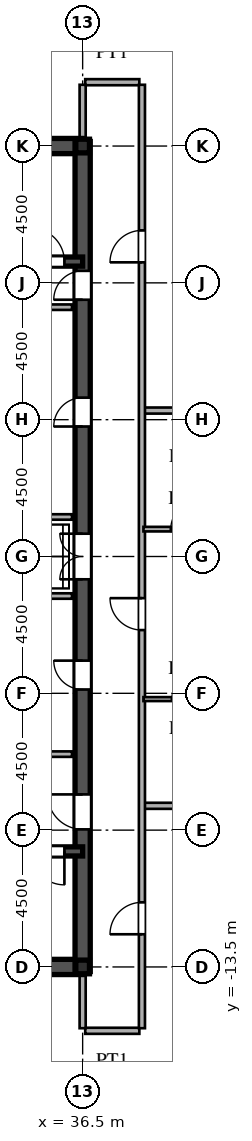
"""IFC4 building model, lengths in metres.
Left out: names, types, materials, properties, quantities, classifications, styles, units other than length and angle.
Written with IfcOpenShell. Run it as: python <this file> out.ifc"""

import sys

from ifc_helpers import new_model, si_unit, direction, frame, frame_2d, origin, origin_2d, place, context, subcontext, project, spatial, rectangle, i_section, extrude, source, transform, mapped, element, fill, save


model = new_model("IFC4")
c1 = context("Model", 3, precision=1e-05, world=origin(), true_north=direction((0.0, 1.0)))
c2 = subcontext(c1, "Body", "Model", "MODEL_VIEW")
j1 = project(units=[si_unit("LENGTHUNIT", "METRE"), si_unit("PLANEANGLEUNIT", "RADIAN")], contexts=[c1])
p1 = place(None, origin())
s1 = spatial("IfcSite", under=j1, at=p1, CompositionType="ELEMENT")
p2 = place(p1, origin())
s2 = spatial("IfcBuilding", under=s1, at=p2, CompositionType="ELEMENT")
p3 = place(p2, frame((0.0, 0.0, 250.65)))
s3 = spatial("IfcBuildingStorey", under=s2, at=p3, CompositionType="ELEMENT", Elevation=250.65)
m1 = source(origin(), c2, "Body", "SweptSolid", [
    extrude(i_section(OverallWidth=0.45, OverallDepth=0.45, WebThickness=0.016, FlangeThickness=0.025, at=origin_2d()), origin(), (0.0, 0.0, 1.0), 3.75),
])
for number, where, z_axis, x_axis in (
    (1, (36.5, -13.5, 0.0), (0.0, 0.0, 1.0), (1.0, 0.0, 0.0)),
    (2, (36.5, 13.5, 0.0), (0.0, 0.0, 1.0), (1.0, 0.0, 0.0)),
):
    element("IfcColumn", number, at=place(p3, frame(where, z_axis=z_axis, x_axis=x_axis)), inside=s3, PredefinedType="COLUMN", context=c2, shape_type="MappedRepresentation", body=[
        mapped(m1, transform((0.0, 0.0, 0.0), scale=1.0)),
    ])
for number, where, z_axis, x_axis in (
    (3, (27.5, -13.5, 0.0), (0.0, 0.0, 1.0), (1.0, 0.0, 0.0)),
    (4, (27.5, 13.5, 0.0), (0.0, 0.0, 1.0), (1.0, 0.0, 0.0)),
):
    element("IfcWall", number, at=place(p3, frame(where, z_axis=z_axis, x_axis=x_axis)), inside=s3, PredefinedType="SHEAR", context=c2, shape_type="SweptSolid", body=[
        extrude(rectangle(XDim=9.0, YDim=0.5, at=frame_2d((4.5, 0.0))), origin(), (0.0, 0.0, 1.0), 3.53),
    ])
p4 = place(p3, frame((36.5, -13.65, 0.0), z_axis=(0.0, 0.0, 1.0), x_axis=(0.0, 1.0, 0.0)))
e5 = element("IfcWall", 5, at=p4, inside=s3, PredefinedType="SHEAR", context=c2, shape_type="SweptSolid", body=[
    extrude(rectangle(XDim=7.15, YDim=0.5, at=frame_2d((3.575, 0.0))), origin(), (0.0, 0.0, 1.0), 3.53),
])
p5 = place(p4, frame((4.675, 0.0, 0.0)))
e6 = element("IfcOpeningElement", 6, at=p5, cuts=e5, PredefinedType="OPENING", context=c2, shape_type="SweptSolid", body=[
    extrude(rectangle(XDim=1.15, YDim=2.2, at=frame_2d((0.575, 1.1))), frame((0.0, 0.26, 0.0), z_axis=(0.0, -1.0, 0.0), x_axis=(1.0, 0.0, 0.0)), (0.0, 0.0, 1.0), 0.52),
])
p6 = place(p3, frame((36.5, -1.3, 0.0), z_axis=(0.0, 0.0, 1.0), x_axis=(0.0, 1.0, 0.0)))
e7 = element("IfcWall", 7, at=p6, inside=s3, PredefinedType="SHEAR", context=c2, shape_type="SweptSolid", body=[
    extrude(rectangle(XDim=2.6, YDim=0.5, at=frame_2d((1.3, 0.0))), origin(), (0.0, 0.0, 1.0), 3.53),
])
p7 = place(p6, frame((0.55, 0.0, 0.0)))
e8 = element("IfcOpeningElement", 8, at=p7, cuts=e7, PredefinedType="OPENING", context=c2, shape_type="SweptSolid", body=[
    extrude(rectangle(XDim=1.5, YDim=2.3, at=frame_2d((0.75, 1.15))), frame((0.0, 0.26, 0.0), z_axis=(0.0, -1.0, 0.0), x_axis=(1.0, 0.0, 0.0)), (0.0, 0.0, 1.0), 0.52),
])
p8 = place(p3, frame((36.5, 8.2, 0.0), z_axis=(0.0, 0.0, 1.0), x_axis=(0.0, 1.0, 0.0)))
e9 = element("IfcWall", 9, at=p8, inside=s3, PredefinedType="SHEAR", context=c2, shape_type="SweptSolid", body=[
    extrude(rectangle(XDim=5.45, YDim=0.5, at=frame_2d((2.725, 0.0))), origin(), (0.0, 0.0, 1.0), 3.53),
])
p9 = place(p8, frame((0.245, 0.0, 0.0)))
e10 = element("IfcOpeningElement", 10, at=p9, cuts=e9, PredefinedType="OPENING", context=c2, shape_type="SweptSolid", body=[
    extrude(rectangle(XDim=0.95, YDim=2.15, at=frame_2d((0.475, 1.075))), frame((0.0, 0.26, 0.0), z_axis=(0.0, -1.0, 0.0), x_axis=(1.0, 0.0, 0.0)), (0.0, 0.0, 1.0), 0.52),
])
p10 = place(p3, frame((36.5, -6.5, 0.0), z_axis=(0.0, 0.0, 1.0), x_axis=(0.0, 1.0, 0.0)))
e11 = element("IfcWall", 11, at=p10, inside=s3, PredefinedType="SHEAR", context=c2, shape_type="SweptSolid", body=[
    extrude(rectangle(XDim=5.2, YDim=0.5, at=frame_2d((2.6, 0.0))), origin(), (0.0, 0.0, 1.0), 3.53),
])
p11 = place(p10, frame((2.125, 0.0, 0.0)))
e12 = element("IfcOpeningElement", 12, at=p11, cuts=e11, PredefinedType="OPENING", context=c2, shape_type="SweptSolid", body=[
    extrude(rectangle(XDim=0.95, YDim=2.15, at=frame_2d((0.475, 1.075))), frame((0.0, 0.26, 0.0), z_axis=(0.0, -1.0, 0.0), x_axis=(1.0, 0.0, 0.0)), (0.0, 0.0, 1.0), 0.52),
])
p12 = place(p3, frame((36.5, 1.3, 0.0), z_axis=(0.0, 0.0, 1.0), x_axis=(0.0, 1.0, 0.0)))
e13 = element("IfcWall", 13, at=p12, inside=s3, PredefinedType="SHEAR", context=c2, shape_type="SweptSolid", body=[
    extrude(rectangle(XDim=6.9, YDim=0.5, at=frame_2d((3.45, 0.0))), origin(), (0.0, 0.0, 1.0), 3.53),
])
p13 = place(p12, frame((2.975, 0.0, 0.0)))
e14 = element("IfcOpeningElement", 14, at=p13, cuts=e13, PredefinedType="OPENING", context=c2, shape_type="SweptSolid", body=[
    extrude(rectangle(XDim=0.95, YDim=2.15, at=frame_2d((0.475, 1.075))), frame((0.0, 0.26, 0.0), z_axis=(0.0, -1.0, 0.0), x_axis=(1.0, 0.0, 0.0)), (0.0, 0.0, 1.0), 0.52),
])
p14 = place(p3, frame((27.5, -9.7, 0.0), z_axis=(0.0, 0.0, 1.0), x_axis=(1.0, 0.0, 0.0)))
e15 = element("IfcWall", 15, at=p14, inside=s3, PredefinedType="SHEAR", context=c2, shape_type="SweptSolid", body=[
    extrude(rectangle(XDim=9.0, YDim=0.3, at=frame_2d((4.5, 0.0))), origin(), (0.0, 0.0, 1.0), 3.53),
])
p15 = place(p14, frame((7.3, 0.0, 0.0)))
e16 = element("IfcOpeningElement", 16, at=p15, cuts=e15, PredefinedType="OPENING", context=c2, shape_type="SweptSolid", body=[
    extrude(rectangle(XDim=1.1, YDim=2.2, at=frame_2d((0.55, 1.1))), frame((0.0, 0.16, 0.0), z_axis=(0.0, -1.0, 0.0), x_axis=(1.0, 0.0, 0.0)), (0.0, 0.0, 1.0), 0.32),
])
p16 = place(p3, frame((27.5, 9.7, 0.0), z_axis=(0.0, 0.0, 1.0), x_axis=(1.0, 0.0, 0.0)))
e17 = element("IfcWall", 17, at=p16, inside=s3, PredefinedType="SHEAR", context=c2, shape_type="SweptSolid", body=[
    extrude(rectangle(XDim=9.0, YDim=0.3, at=frame_2d((4.5, 0.0))), origin(), (0.0, 0.0, 1.0), 3.53),
])
p17 = place(p16, frame((7.3, 0.0, 0.0)))
e18 = element("IfcOpeningElement", 18, at=p17, cuts=e17, PredefinedType="OPENING", context=c2, shape_type="SweptSolid", body=[
    extrude(rectangle(XDim=1.1, YDim=2.2, at=frame_2d((0.55, 1.1))), frame((0.0, 0.16, 0.0), z_axis=(0.0, -1.0, 0.0), x_axis=(1.0, 0.0, 0.0)), (0.0, 0.0, 1.0), 0.32),
])
for number, where, z_axis, x_axis in (
    (19, (30.45, -6.5, 0.0), (0.0, 0.0, 1.0), (1.0, 0.0, 0.0)),
    (20, (30.45, 8.2, 0.0), (0.0, 0.0, 1.0), (1.0, 0.0, 0.0)),
):
    element("IfcWall", number, at=place(p3, frame(where, z_axis=z_axis, x_axis=x_axis)), inside=s3, PredefinedType="PARTITIONING", context=c2, shape_type="SweptSolid", body=[
        extrude(rectangle(XDim=5.7, YDim=0.18, at=frame_2d((2.85, 0.0))), origin(), (0.0, 0.0, 1.0), 3.53),
    ])
for number, where, z_axis, x_axis in (
    (21, (33.2, -1.3, 0.0), (0.0, 0.0, 1.0), (1.0, 0.0, 0.0)),
    (22, (33.2, 1.3, 0.0), (0.0, 0.0, 1.0), (1.0, 0.0, 0.0)),
):
    element("IfcWall", number, at=place(p3, frame(where, z_axis=z_axis, x_axis=x_axis)), inside=s3, PredefinedType="PARTITIONING", context=c2, shape_type="SweptSolid", body=[
        extrude(rectangle(XDim=2.95, YDim=0.18, at=frame_2d((1.475, 0.0))), origin(), (0.0, 0.0, 1.0), 3.53),
    ])
p18 = place(p3, frame((36.585, -15.6, 0.0), z_axis=(0.0, 0.0, 1.0), x_axis=(1.0, 0.0, 0.0)))
e23 = element("IfcWall", 23, at=p18, inside=s3, PredefinedType="PARTITIONING", context=c2, shape_type="SweptSolid", body=[
    extrude(rectangle(XDim=1.78, YDim=0.2, at=frame_2d((0.89, 0.0))), origin(), (0.0, 0.0, 1.0), 3.53),
])
p19 = place(p3, frame((38.53, -8.2, 0.0), z_axis=(0.0, 0.0, 1.0), x_axis=(1.0, 0.0, 0.0)))
e24 = element("IfcWall", 24, at=p19, inside=s3, PredefinedType="PARTITIONING", context=c2, shape_type="SweptSolid", body=[
    extrude(rectangle(XDim=17.813, YDim=0.2, at=frame_2d((8.906, 0.0))), origin(), (0.0, 0.0, 1.0), 3.53),
])
p20 = place(p3, frame((38.5, -4.69, 0.0), z_axis=(0.0, 0.0, 1.0), x_axis=(1.0, 0.0, 0.0)))
e25 = element("IfcWall", 25, at=p20, inside=s3, PredefinedType="PARTITIONING", context=c2, shape_type="SweptSolid", body=[
    extrude(rectangle(XDim=2.75, YDim=0.13, at=frame_2d((1.375, 0.0))), origin(), (0.0, 0.0, 1.0), 3.53),
])
p21 = place(p20, frame((0.935, 0.0, 0.0)))
e26 = element("IfcOpeningElement", 26, at=p21, cuts=e25, PredefinedType="OPENING", context=c2, shape_type="SweptSolid", body=[
    extrude(rectangle(XDim=0.88, YDim=2.1, at=frame_2d((0.44, 1.05))), frame((0.0, 0.075, 0.0), z_axis=(0.0, -1.0, 0.0), x_axis=(1.0, 0.0, 0.0)), (0.0, 0.0, 1.0), 0.15),
])
p22 = place(p3, frame((38.5, 0.9, 0.0), z_axis=(0.0, 0.0, 1.0), x_axis=(1.0, 0.0, 0.0)))
e27 = element("IfcWall", 27, at=p22, inside=s3, PredefinedType="PARTITIONING", context=c2, shape_type="SweptSolid", body=[
    extrude(rectangle(XDim=2.75, YDim=0.15, at=frame_2d((1.375, 0.0))), origin(), (0.0, 0.0, 1.0), 3.53),
])
p23 = place(p22, frame((0.9, 0.0, 0.0)))
e28 = element("IfcOpeningElement", 28, at=p23, cuts=e27, PredefinedType="OPENING", context=c2, shape_type="SweptSolid", body=[
    extrude(rectangle(XDim=0.95, YDim=2.15, at=frame_2d((0.475, 1.075))), frame((0.0, 0.085, 0.0), z_axis=(0.0, -1.0, 0.0), x_axis=(1.0, 0.0, 0.0)), (0.0, 0.0, 1.0), 0.17),
])
p24 = place(p3, frame((38.53, 4.8, 0.0), z_axis=(0.0, 0.0, 1.0), x_axis=(1.0, 0.0, 0.0)))
e29 = element("IfcWall", 29, at=p24, inside=s3, PredefinedType="PARTITIONING", context=c2, shape_type="SweptSolid", body=[
    extrude(rectangle(XDim=23.48, YDim=0.2, at=frame_2d((11.74, 0.0))), origin(), (0.0, 0.0, 1.0), 3.53),
])
p25 = place(p3, frame((36.585, 15.6, 0.0), z_axis=(0.0, 0.0, 1.0), x_axis=(1.0, 0.0, 0.0)))
e30 = element("IfcWall", 30, at=p25, inside=s3, PredefinedType="PARTITIONING", context=c2, shape_type="SweptSolid", body=[
    extrude(rectangle(XDim=1.78, YDim=0.2, at=frame_2d((0.89, 0.0))), origin(), (0.0, 0.0, 1.0), 3.53),
])
for number, where, z_axis, x_axis in (
    (31, (36.5, -15.515, 0.0), (0.0, 0.0, 1.0), (0.0, 1.0, 0.0)),
    (32, (36.5, 13.755, 0.0), (0.0, 0.0, 1.0), (0.0, 1.0, 0.0)),
):
    element("IfcWall", number, at=place(p3, frame(where, z_axis=z_axis, x_axis=x_axis)), inside=s3, PredefinedType="PARTITIONING", context=c2, shape_type="SweptSolid", body=[
        extrude(rectangle(XDim=1.76, YDim=0.2, at=frame_2d((0.88, 0.0))), origin(), (0.0, 0.0, 1.0), 2.93),
    ])
p26 = place(p3, frame((38.45, -15.515, 0.0), z_axis=(0.0, 0.0, 1.0), x_axis=(0.0, 1.0, 0.0)))
e33 = element("IfcWall", 33, at=p26, inside=s3, PredefinedType="PARTITIONING", context=c2, shape_type="SweptSolid", body=[
    extrude(rectangle(XDim=31.03, YDim=0.2, at=frame_2d((15.515, 0.0))), origin(), (0.0, 0.0, 1.0), 3.53),
])
p27 = place(p26, frame((3.09, 0.0, 0.0)))
e34 = element("IfcOpeningElement", 34, at=p27, cuts=e33, PredefinedType="OPENING", context=c2, shape_type="SweptSolid", body=[
    extrude(rectangle(XDim=1.05, YDim=2.25, at=frame_2d((0.525, 1.125))), frame((0.0, 0.11, 0.0), z_axis=(0.0, -1.0, 0.0), x_axis=(1.0, 0.0, 0.0)), (0.0, 0.0, 1.0), 0.22),
])
p28 = place(p26, frame((13.095, 0.0, 0.0)))
e35 = element("IfcOpeningElement", 35, at=p28, cuts=e33, PredefinedType="OPENING", context=c2, shape_type="SweptSolid", body=[
    extrude(rectangle(XDim=1.05, YDim=2.25, at=frame_2d((0.525, 1.125))), frame((0.0, 0.11, 0.0), z_axis=(0.0, -1.0, 0.0), x_axis=(1.0, 0.0, 0.0)), (0.0, 0.0, 1.0), 0.22),
])
p29 = place(p26, frame((25.19, 0.0, 0.0)))
e36 = element("IfcOpeningElement", 36, at=p29, cuts=e33, PredefinedType="OPENING", context=c2, shape_type="SweptSolid", body=[
    extrude(rectangle(XDim=1.05, YDim=2.25, at=frame_2d((0.525, 1.125))), frame((0.0, 0.11, 0.0), z_axis=(0.0, -1.0, 0.0), x_axis=(1.0, 0.0, 0.0)), (0.0, 0.0, 1.0), 0.22),
])
m2 = source(origin(), c2, "Body", "SweptSolid", [
    extrude(rectangle(XDim=1.15, YDim=2.2, at=frame_2d((0.575, 1.1))), frame((0.0, 0.025, 0.0), z_axis=(0.0, -1.0, 0.0), x_axis=(1.0, 0.0, 0.0)), (0.0, 0.0, 1.0), 0.05),
])
p30 = place(p5, origin())
e37 = element("IfcDoor", 37, at=p30, inside=s3, OperationType="SINGLE_SWING_RIGHT", PredefinedType="DOOR", context=c2, shape_type="MappedRepresentation", body=[
    mapped(m2, transform((0.0, 0.0, 0.0), scale=1.0)),
])
fill(e6, e37)
m3 = source(origin(), c2, "Body", "SweptSolid", [
    extrude(rectangle(XDim=1.5, YDim=2.3, at=frame_2d((0.75, 1.15))), frame((0.0, 0.025, 0.0), z_axis=(0.0, -1.0, 0.0), x_axis=(1.0, 0.0, 0.0)), (0.0, 0.0, 1.0), 0.05),
])
p31 = place(p7, origin())
e38 = element("IfcDoor", 38, at=p31, inside=s3, OperationType="DOUBLE_SWING_LEFT", PredefinedType="DOOR", context=c2, shape_type="MappedRepresentation", body=[
    mapped(m3, transform((0.0, 0.0, 0.0), scale=1.0)),
])
fill(e8, e38)
m4 = source(origin(), c2, "Body", "SweptSolid", [
    extrude(rectangle(XDim=0.95, YDim=2.15, at=frame_2d((0.475, 1.075))), frame((0.0, 0.025, 0.0), z_axis=(0.0, -1.0, 0.0), x_axis=(1.0, 0.0, 0.0)), (0.0, 0.0, 1.0), 0.05),
])
p32 = place(p9, origin())
e39 = element("IfcDoor", 39, at=p32, inside=s3, OperationType="SINGLE_SWING_LEFT", PredefinedType="DOOR", context=c2, shape_type="MappedRepresentation", body=[
    mapped(m4, transform((0.0, 0.0, 0.0), scale=1.0)),
])
fill(e10, e39)
p33 = place(p11, origin())
e40 = element("IfcDoor", 40, at=p33, inside=s3, OperationType="SINGLE_SWING_RIGHT", PredefinedType="DOOR", context=c2, shape_type="MappedRepresentation", body=[
    mapped(m4, transform((0.0, 0.0, 0.0), scale=1.0)),
])
fill(e12, e40)
p34 = place(p13, origin())
e41 = element("IfcDoor", 41, at=p34, inside=s3, OperationType="SINGLE_SWING_LEFT", PredefinedType="DOOR", context=c2, shape_type="MappedRepresentation", body=[
    mapped(m4, transform((0.0, 0.0, 0.0), scale=1.0)),
])
fill(e14, e41)
m5 = source(origin(), c2, "Body", "SweptSolid", [
    extrude(rectangle(XDim=1.1, YDim=2.2, at=frame_2d((0.55, 1.1))), frame((0.0, 0.025, 0.0), z_axis=(0.0, -1.0, 0.0), x_axis=(1.0, 0.0, 0.0)), (0.0, 0.0, 1.0), 0.05),
])
p35 = place(p15, frame((1.1, 0.0, 0.0), z_axis=(0.0, 0.0, 1.0), x_axis=(-1.0, 0.0, 0.0)))
e42 = element("IfcDoor", 42, at=p35, inside=s3, OperationType="SINGLE_SWING_RIGHT", PredefinedType="DOOR", context=c2, shape_type="MappedRepresentation", body=[
    mapped(m5, transform((0.0, 0.0, 0.0), scale=1.0)),
])
fill(e16, e42)
p36 = place(p17, origin())
e43 = element("IfcDoor", 43, at=p36, inside=s3, OperationType="SINGLE_SWING_LEFT", PredefinedType="DOOR", context=c2, shape_type="MappedRepresentation", body=[
    mapped(m5, transform((0.0, 0.0, 0.0), scale=1.0)),
])
fill(e18, e43)
m6 = source(origin(), c2, "Body", "SweptSolid", [
    extrude(rectangle(XDim=0.88, YDim=2.1, at=frame_2d((0.44, 1.05))), frame((0.0, 0.025, 0.0), z_axis=(0.0, -1.0, 0.0), x_axis=(1.0, 0.0, 0.0)), (0.0, 0.0, 1.0), 0.05),
])
p37 = place(p21, origin())
e44 = element("IfcDoor", 44, at=p37, inside=s3, OperationType="SINGLE_SWING_RIGHT", PredefinedType="DOOR", context=c2, shape_type="MappedRepresentation", body=[
    mapped(m6, transform((0.0, 0.0, 0.0), scale=1.0)),
])
fill(e26, e44)
m7 = source(origin(), c2, "Body", "SweptSolid", [
    extrude(rectangle(XDim=0.95, YDim=2.15, at=frame_2d((0.475, 1.075))), frame((0.0, 0.025, 0.0), z_axis=(0.0, -1.0, 0.0), x_axis=(1.0, 0.0, 0.0)), (0.0, 0.0, 1.0), 0.05),
])
p38 = place(p23, origin())
e45 = element("IfcDoor", 45, at=p38, inside=s3, OperationType="SINGLE_SWING_RIGHT", PredefinedType="DOOR", context=c2, shape_type="MappedRepresentation", body=[
    mapped(m7, transform((0.0, 0.0, 0.0), scale=1.0)),
])
fill(e28, e45)
m8 = source(origin(), c2, "Body", "SweptSolid", [
    extrude(rectangle(XDim=1.05, YDim=2.25, at=frame_2d((0.525, 1.125))), frame((0.0, 0.025, 0.0), z_axis=(0.0, -1.0, 0.0), x_axis=(1.0, 0.0, 0.0)), (0.0, 0.0, 1.0), 0.05),
])
p39 = place(p27, origin())
e46 = element("IfcDoor", 46, at=p39, inside=s3, OperationType="SINGLE_SWING_LEFT", PredefinedType="DOOR", context=c2, shape_type="MappedRepresentation", body=[
    mapped(m8, transform((0.0, 0.0, 0.0), scale=1.0)),
])
fill(e34, e46)
p40 = place(p28, origin())
e47 = element("IfcDoor", 47, at=p40, inside=s3, OperationType="SINGLE_SWING_RIGHT", PredefinedType="DOOR", context=c2, shape_type="MappedRepresentation", body=[
    mapped(m8, transform((0.0, 0.0, 0.0), scale=1.0)),
])
fill(e35, e47)
p41 = place(p29, origin())
e48 = element("IfcDoor", 48, at=p41, inside=s3, OperationType="SINGLE_SWING_LEFT", PredefinedType="DOOR", context=c2, shape_type="MappedRepresentation", body=[
    mapped(m8, transform((0.0, 0.0, 0.0), scale=1.0)),
])
fill(e36, e48)
save(model, sys.argv[1])
